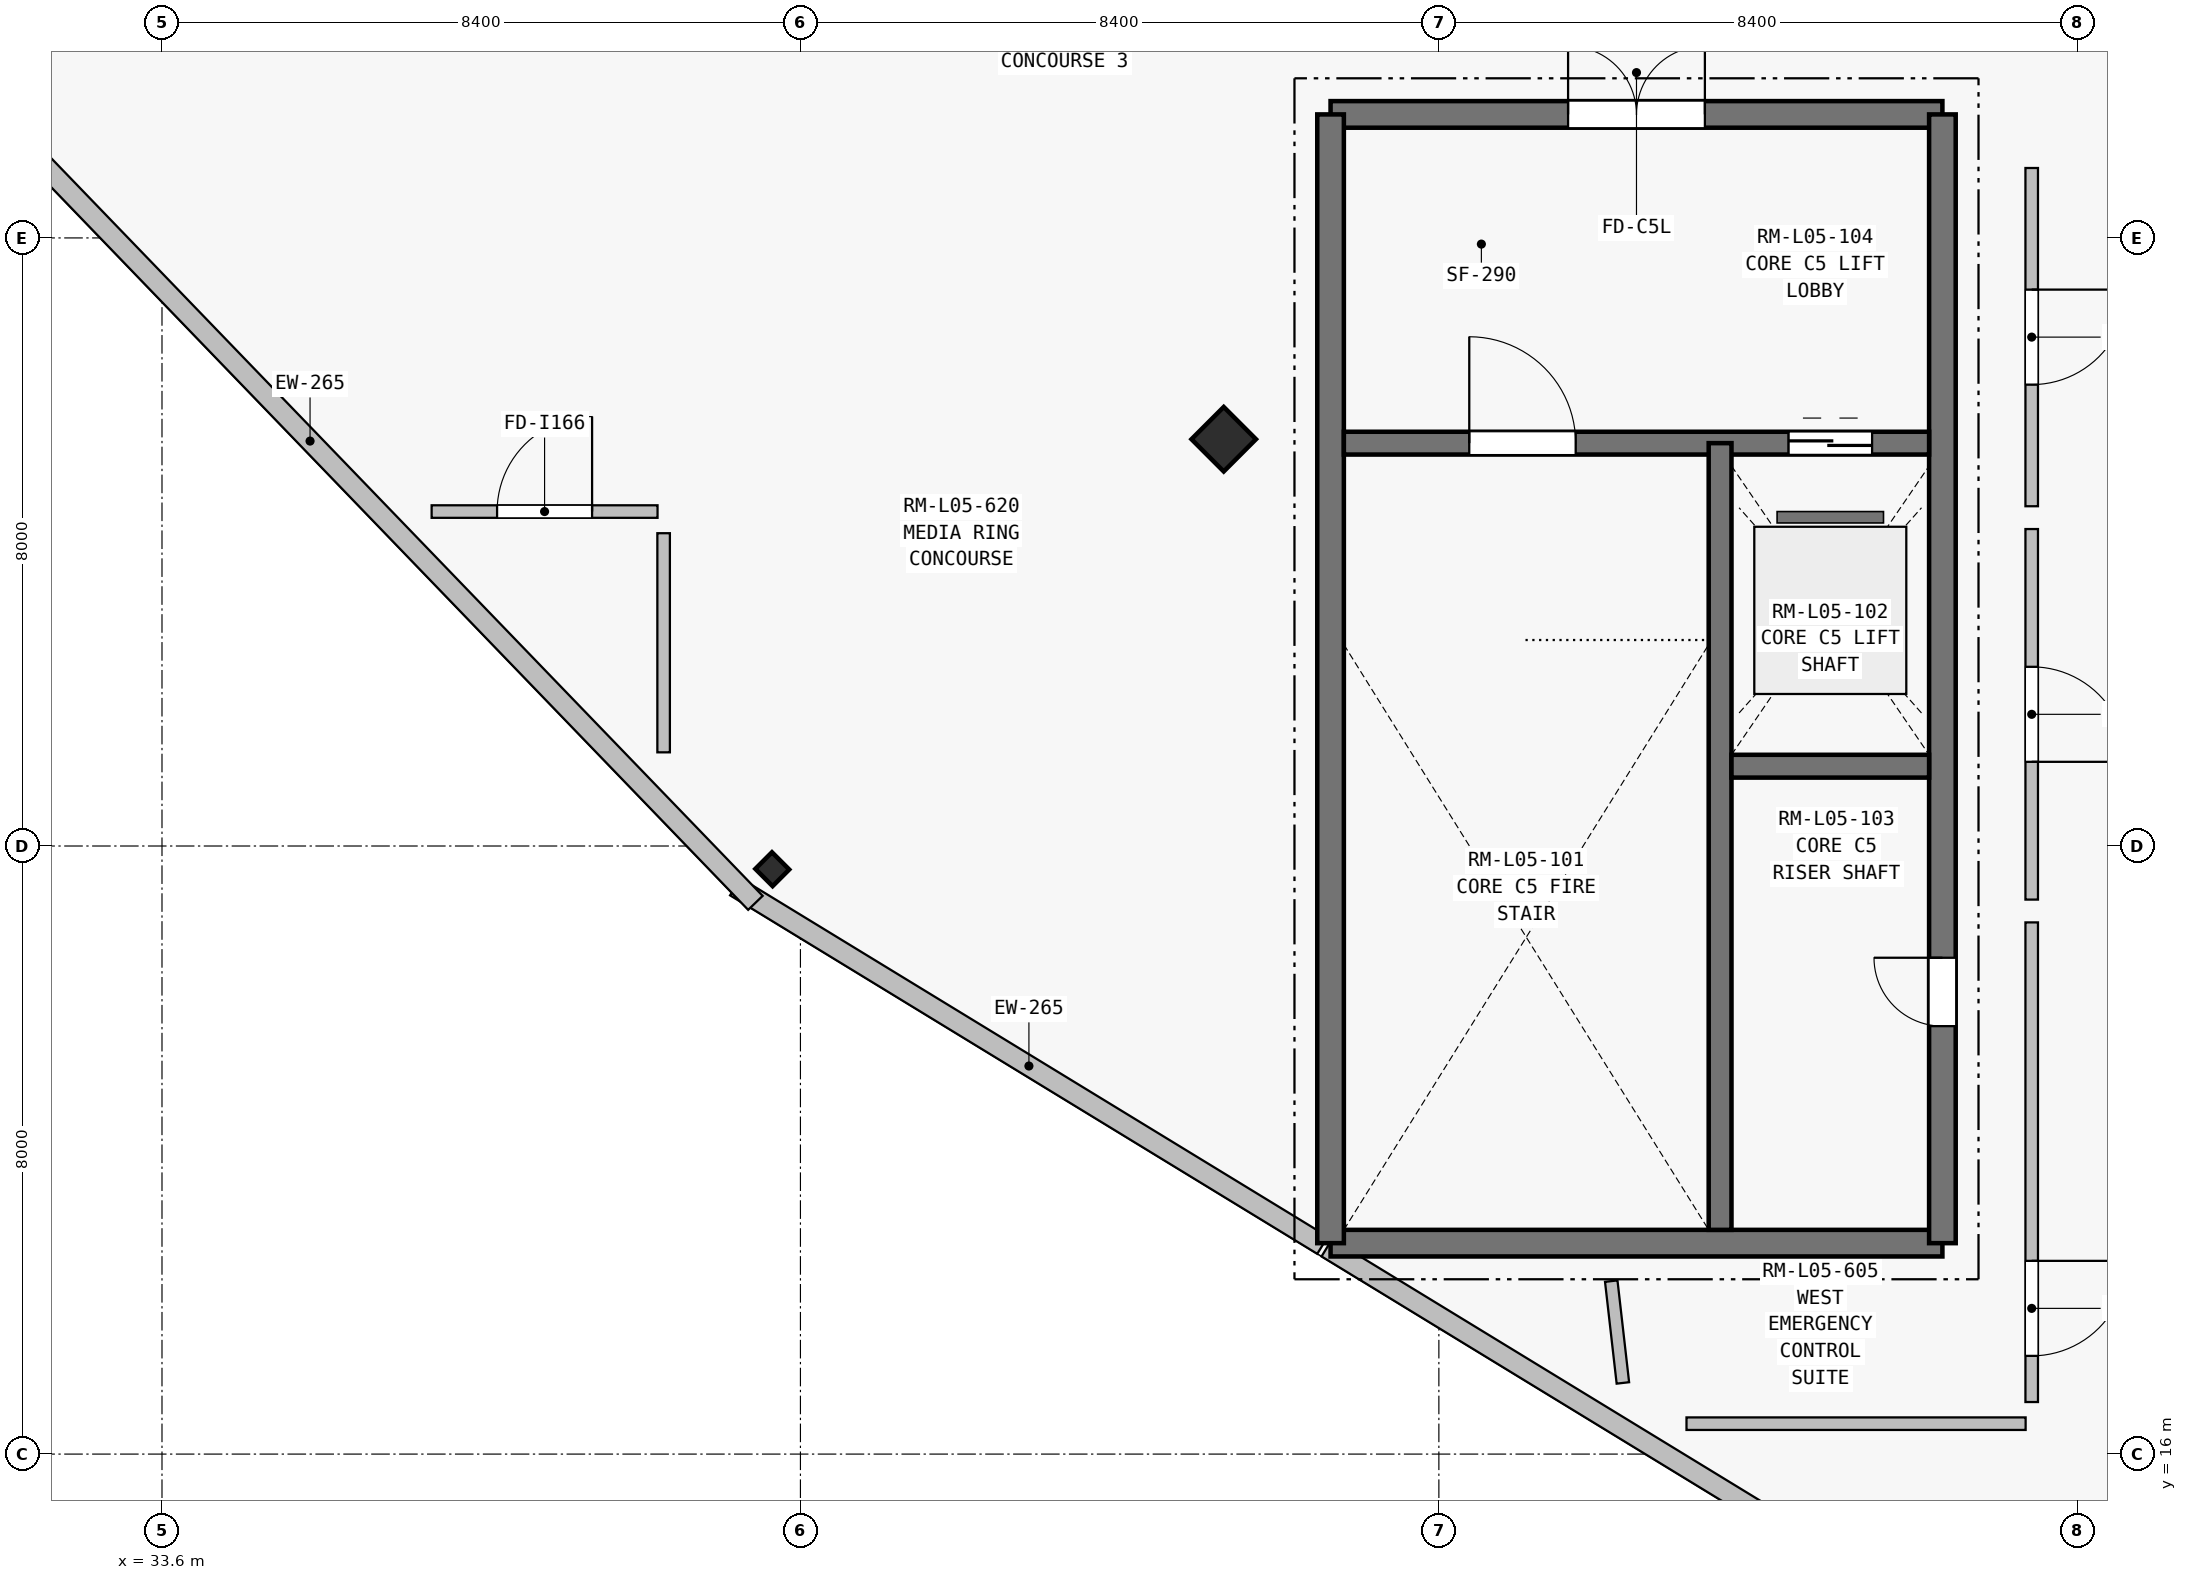
"""IFC4 building model, lengths in metres.
Left out: names, types, materials, properties, quantities, classifications, styles, units other than length and angle.
Written with IfcOpenShell. Run it as: python <this file> out.ifc"""

import sys

from ifc_helpers import new_model, si_unit, direction, frame, frame_2d, origin, origin_2d, place, context, subcontext, project, spatial, rectangle, i_section, extrude, element, fill, save


model = new_model("IFC4")
c1 = context("Model", 3, precision=1e-05, world=origin(), true_north=direction((0.0, 1.0)))
c2 = subcontext(c1, "Body", "Model", "MODEL_VIEW")
j1 = project(units=[si_unit("LENGTHUNIT", "METRE"), si_unit("PLANEANGLEUNIT", "RADIAN")], contexts=[c1])
p1 = place(None, origin())
s1 = spatial("IfcSite", under=j1, at=p1, CompositionType="ELEMENT")
p2 = place(p1, origin())
s2 = spatial("IfcBuilding", under=s1, at=p2, CompositionType="ELEMENT")
p3 = place(p2, frame((0.0, 0.0, 23.4)))
s3 = spatial("IfcBuildingStorey", under=s2, at=p3, CompositionType="ELEMENT", Elevation=23.4)
p4 = place(p3, frame((47.569, 29.352, 0.0), z_axis=(0.0, 0.0, 1.0), x_axis=(-0.707106781187, -0.707106781187, 0.0)))
e1 = element("IfcColumn", 1, at=p4, inside=s3, PredefinedType="COLUMN", context=c2, shape_type="SweptSolid", body=[
    extrude(rectangle(XDim=0.6, YDim=0.6, at=origin_2d()), origin(), (0.0, 0.0, 1.0), 3.15),
])
p5 = place(p3, frame((41.63, 23.695, 0.0), z_axis=(0.0, 0.0, 1.0), x_axis=(-0.707106781187, -0.707106781187, 0.0)))
e2 = element("IfcColumn", 2, at=p5, inside=s3, PredefinedType="COLUMN", context=c2, shape_type="SweptSolid", body=[
    extrude(i_section(OverallWidth=0.309, OverallDepth=0.321, WebThickness=0.014, FlangeThickness=0.022, at=origin_2d()), origin(), (0.0, 0.0, 1.0), 3.32),
])
p6 = place(p3, frame((56.4, 14.15, 0.0), z_axis=(0.0, 0.0, 1.0), x_axis=(-0.853522240257, 0.521056412864, 0.0)))
e3 = element("IfcWall", 3, at=p6, inside=s3, PredefinedType="SOLIDWALL", context=c2, shape_type="SweptSolid", body=[
    extrude(rectangle(XDim=8.758, YDim=0.265, at=frame_2d((4.379, 0.0))), origin(), (0.0, 0.0, 1.0), 3.18),
])
p7 = place(p3, frame((48.869, 18.748, 0.0), z_axis=(0.0, 0.0, 1.0), x_axis=(-0.853521769318, 0.52105718429, 0.0)))
e4 = element("IfcWall", 4, at=p7, inside=s3, PredefinedType="SOLIDWALL", context=c2, shape_type="SweptSolid", body=[
    extrude(rectangle(XDim=9.052, YDim=0.265, at=frame_2d((4.526, 0.0))), origin(), (0.0, 0.0, 1.0), 3.18),
])
p8 = place(p3, frame((41.408, 23.252, 0.0), z_axis=(0.0, 0.0, 1.0), x_axis=(-0.694213985366, 0.719768672924, 0.0)))
e5 = element("IfcWall", 5, at=p8, inside=s3, PredefinedType="SOLIDWALL", context=c2, shape_type="SweptSolid", body=[
    extrude(rectangle(XDim=16.881, YDim=0.265, at=frame_2d((8.441, 0.0))), origin(), (0.0, 0.0, 1.0), 3.18),
])
p9 = place(p3, frame((48.975, 18.775, 0.0), z_axis=(0.0, 0.0, 1.0), x_axis=(1.0, 0.0, 0.0)))
e6 = element("IfcWall", 6, at=p9, inside=s3, PredefinedType="SHEAR", context=c2, shape_type="SweptSolid", body=[
    extrude(rectangle(XDim=8.05, YDim=0.35, at=frame_2d((4.025, 0.0))), origin(), (0.0, 0.0, 1.0), 3.08),
])
p10 = place(p3, frame((48.975, 33.625, 0.0), z_axis=(0.0, 0.0, 1.0), x_axis=(1.0, 0.0, 0.0)))
e7 = element("IfcWall", 7, at=p10, inside=s3, PredefinedType="SHEAR", context=c2, shape_type="SweptSolid", body=[
    extrude(rectangle(XDim=8.05, YDim=0.35, at=frame_2d((4.025, 0.0))), origin(), (0.0, 0.0, 1.0), 3.08),
])
p11 = place(p10, frame((3.125, 0.0, 0.0)))
e8 = element("IfcOpeningElement", 8, at=p11, cuts=e7, PredefinedType="OPENING", context=c2, shape_type="SweptSolid", body=[
    extrude(rectangle(XDim=1.8, YDim=2.25, at=frame_2d((0.9, 1.125))), frame((0.0, 0.185, 0.0), z_axis=(0.0, -1.0, 0.0), x_axis=(1.0, 0.0, 0.0)), (0.0, 0.0, 1.0), 0.37),
])
p12 = place(p3, frame((48.975, 18.775, 0.0), z_axis=(0.0, 0.0, 1.0), x_axis=(0.0, 1.0, 0.0)))
e9 = element("IfcWall", 9, at=p12, inside=s3, PredefinedType="SHEAR", context=c2, shape_type="SweptSolid", body=[
    extrude(rectangle(XDim=14.85, YDim=0.35, at=frame_2d((7.425, 0.0))), origin(), (0.0, 0.0, 1.0), 3.08),
])
p13 = place(p3, frame((57.025, 18.775, 0.0), z_axis=(0.0, 0.0, 1.0), x_axis=(0.0, 1.0, 0.0)))
e10 = element("IfcWall", 10, at=p13, inside=s3, PredefinedType="SHEAR", context=c2, shape_type="SweptSolid", body=[
    extrude(rectangle(XDim=14.85, YDim=0.35, at=frame_2d((7.425, 0.0))), origin(), (0.0, 0.0, 1.0), 3.08),
])
p14 = place(p13, frame((2.855, 0.0, 0.0)))
e11 = element("IfcOpeningElement", 11, at=p14, cuts=e10, PredefinedType="OPENING", context=c2, shape_type="SweptSolid", body=[
    extrude(rectangle(XDim=0.9, YDim=2.1, at=frame_2d((0.45, 1.05))), frame((0.0, 0.185, 0.0), z_axis=(0.0, -1.0, 0.0), x_axis=(1.0, 0.0, 0.0)), (0.0, 0.0, 1.0), 0.37),
])
p15 = place(p3, frame((49.15, 29.3, 0.0), z_axis=(0.0, 0.0, 1.0), x_axis=(1.0, 0.0, 0.0)))
e12 = element("IfcWall", 12, at=p15, inside=s3, PredefinedType="SHEAR", context=c2, shape_type="SweptSolid", body=[
    extrude(rectangle(XDim=7.7, YDim=0.3, at=frame_2d((3.85, 0.0))), origin(), (0.0, 0.0, 1.0), 3.08),
])
p16 = place(p15, frame((1.65, 0.0, 0.0)))
e13 = element("IfcOpeningElement", 13, at=p16, cuts=e12, PredefinedType="OPENING", context=c2, shape_type="SweptSolid", body=[
    extrude(rectangle(XDim=1.4, YDim=2.2, at=frame_2d((0.7, 1.1))), frame((0.0, 0.16, 0.0), z_axis=(0.0, -1.0, 0.0), x_axis=(1.0, 0.0, 0.0)), (0.0, 0.0, 1.0), 0.32),
])
p17 = place(p15, frame((5.85, 0.0, 0.0)))
e14 = element("IfcOpeningElement", 14, at=p17, cuts=e12, PredefinedType="OPENING", context=c2, shape_type="SweptSolid", body=[
    extrude(rectangle(XDim=1.1, YDim=2.2, at=frame_2d((0.55, 1.1))), frame((0.0, 0.16, 0.0), z_axis=(0.0, -1.0, 0.0), x_axis=(1.0, 0.0, 0.0)), (0.0, 0.0, 1.0), 0.32),
])
p18 = place(p3, frame((54.1, 18.95, 0.0), z_axis=(0.0, 0.0, 1.0), x_axis=(0.0, 1.0, 0.0)))
e15 = element("IfcWall", 15, at=p18, inside=s3, PredefinedType="SHEAR", context=c2, shape_type="SweptSolid", body=[
    extrude(rectangle(XDim=10.35, YDim=0.3, at=frame_2d((5.175, 0.0))), origin(), (0.0, 0.0, 1.0), 3.08),
])
p19 = place(p3, frame((54.25, 25.05, 0.0), z_axis=(0.0, 0.0, 1.0), x_axis=(1.0, 0.0, 0.0)))
e16 = element("IfcWall", 16, at=p19, inside=s3, PredefinedType="SHEAR", context=c2, shape_type="SweptSolid", body=[
    extrude(rectangle(XDim=2.6, YDim=0.3, at=frame_2d((1.3, 0.0))), origin(), (0.0, 0.0, 1.0), 3.08),
])
p20 = place(p3, frame((58.12, 16.4, 0.0), z_axis=(0.0, 0.0, 1.0), x_axis=(-1.0, 0.0, 0.0)))
e17 = element("IfcWall", 17, at=p20, inside=s3, PredefinedType="PARTITIONING", context=c2, shape_type="SweptSolid", body=[
    extrude(rectangle(XDim=4.462, YDim=0.165, at=frame_2d((2.231, 0.0))), origin(), (0.0, 0.0, 1.0), 2.5),
])
p21 = place(p3, frame((52.821, 16.936, 0.0), z_axis=(0.0, 0.0, 1.0), x_axis=(-0.113551698824, 0.99353208891, 0.0)))
e18 = element("IfcWall", 18, at=p21, inside=s3, PredefinedType="PARTITIONING", context=c2, shape_type="SweptSolid", body=[
    extrude(rectangle(XDim=1.348, YDim=0.165, at=frame_2d((0.674, 0.0))), origin(), (0.0, 0.0, 1.0), 2.5),
])
p22 = place(p3, frame((58.2, 22.995, 0.0), z_axis=(0.0, 0.0, 1.0), x_axis=(0.0, -1.0, 0.0)))
e19 = element("IfcWall", 19, at=p22, inside=s3, PredefinedType="PARTITIONING", context=c2, shape_type="SweptSolid", body=[
    extrude(rectangle(XDim=6.31, YDim=0.165, at=frame_2d((3.155, 0.0))), origin(), (0.0, 0.0, 1.0), 3.18),
])
p23 = place(p22, frame((4.453, 0.0, 0.0)))
e20 = element("IfcOpeningElement", 20, at=p23, cuts=e19, PredefinedType="OPENING", context=c2, shape_type="SweptSolid", body=[
    extrude(rectangle(XDim=1.25, YDim=2.25, at=frame_2d((0.625, 1.125))), frame((0.0, 0.093, 0.0), z_axis=(0.0, -1.0, 0.0), x_axis=(1.0, 0.0, 0.0)), (0.0, 0.0, 1.0), 0.185),
])
p24 = place(p3, frame((58.2, 28.17, 0.0), z_axis=(0.0, 0.0, 1.0), x_axis=(0.0, -1.0, 0.0)))
e21 = element("IfcWall", 21, at=p24, inside=s3, PredefinedType="PARTITIONING", context=c2, shape_type="SweptSolid", body=[
    extrude(rectangle(XDim=4.875, YDim=0.165, at=frame_2d((2.438, 0.0))), origin(), (0.0, 0.0, 1.0), 3.18),
])
p25 = place(p24, frame((1.812, 0.0, 0.0)))
e22 = element("IfcOpeningElement", 22, at=p25, cuts=e21, PredefinedType="OPENING", context=c2, shape_type="SweptSolid", body=[
    extrude(rectangle(XDim=1.25, YDim=2.25, at=frame_2d((0.625, 1.125))), frame((0.0, 0.093, 0.0), z_axis=(0.0, -1.0, 0.0), x_axis=(1.0, 0.0, 0.0)), (0.0, 0.0, 1.0), 0.185),
])
p26 = place(p3, frame((58.2, 32.92, 0.0), z_axis=(0.0, 0.0, 1.0), x_axis=(0.0, -1.0, 0.0)))
e23 = element("IfcWall", 23, at=p26, inside=s3, PredefinedType="PARTITIONING", context=c2, shape_type="SweptSolid", body=[
    extrude(rectangle(XDim=4.45, YDim=0.165, at=frame_2d((2.225, 0.0))), origin(), (0.0, 0.0, 1.0), 2.445),
])
p27 = place(p26, frame((1.6, 0.0, 0.0)))
e24 = element("IfcOpeningElement", 24, at=p27, cuts=e23, PredefinedType="OPENING", context=c2, shape_type="SweptSolid", body=[
    extrude(rectangle(XDim=1.25, YDim=2.25, at=frame_2d((0.625, 1.125))), frame((0.0, 0.093, 0.0), z_axis=(0.0, -1.0, 0.0), x_axis=(1.0, 0.0, 0.0)), (0.0, 0.0, 1.0), 0.185),
])
p28 = place(p3, frame((37.148, 28.4, 0.0), z_axis=(0.0, 0.0, 1.0), x_axis=(1.0, 0.0, 0.0)))
e25 = element("IfcWall", 25, at=p28, inside=s3, PredefinedType="PARTITIONING", context=c2, shape_type="SweptSolid", body=[
    extrude(rectangle(XDim=2.972, YDim=0.165, at=frame_2d((1.486, 0.0))), origin(), (0.0, 0.0, 1.0), 2.5),
])
p29 = place(p28, frame((0.861, 0.0, 0.0)))
e26 = element("IfcOpeningElement", 26, at=p29, cuts=e25, PredefinedType="OPENING", context=c2, shape_type="SweptSolid", body=[
    extrude(rectangle(XDim=1.25, YDim=2.25, at=frame_2d((0.625, 1.125))), frame((0.0, 0.093, 0.0), z_axis=(0.0, -1.0, 0.0), x_axis=(1.0, 0.0, 0.0)), (0.0, 0.0, 1.0), 0.185),
])
p30 = place(p3, frame((40.2, 28.115, 0.0), z_axis=(0.0, 0.0, 1.0), x_axis=(0.0, -1.0, 0.0)))
e27 = element("IfcWall", 27, at=p30, inside=s3, PredefinedType="PARTITIONING", context=c2, shape_type="SweptSolid", body=[
    extrude(rectangle(XDim=2.883, YDim=0.165, at=frame_2d((1.441, 0.0))), origin(), (0.0, 0.0, 1.0), 2.5),
])
p31 = place(p11, origin())
e28 = element("IfcDoor", 28, at=p31, inside=s3, OperationType="DOUBLE_DOOR_SINGLE_SWING", PredefinedType="DOOR", context=c2, shape_type="SweptSolid", body=[
    extrude(rectangle(XDim=1.8, YDim=2.25, at=frame_2d((0.9, 1.125))), frame((0.0, 0.025, 0.0), z_axis=(0.0, -1.0, 0.0), x_axis=(1.0, 0.0, 0.0)), (0.0, 0.0, 1.0), 0.05),
])
fill(e8, e28)
p32 = place(p16, origin())
e29 = element("IfcDoor", 29, at=p32, inside=s3, OperationType="SINGLE_SWING_LEFT", PredefinedType="DOOR", context=c2, shape_type="SweptSolid", body=[
    extrude(rectangle(XDim=1.4, YDim=2.2, at=frame_2d((0.7, 1.1))), frame((0.0, 0.025, 0.0), z_axis=(0.0, -1.0, 0.0), x_axis=(1.0, 0.0, 0.0)), (0.0, 0.0, 1.0), 0.05),
])
fill(e13, e29)
p33 = place(p14, origin())
e30 = element("IfcDoor", 30, at=p33, inside=s3, OperationType="SINGLE_SWING_RIGHT", PredefinedType="DOOR", context=c2, shape_type="SweptSolid", body=[
    extrude(rectangle(XDim=0.9, YDim=2.1, at=frame_2d((0.45, 1.05))), frame((0.0, 0.025, 0.0), z_axis=(0.0, -1.0, 0.0), x_axis=(1.0, 0.0, 0.0)), (0.0, 0.0, 1.0), 0.05),
])
fill(e11, e30)
p34 = place(p17, origin())
e31 = element("IfcDoor", 31, at=p34, inside=s3, OperationType="SLIDING_TO_LEFT", PredefinedType="DOOR", context=c2, shape_type="SweptSolid", body=[
    extrude(rectangle(XDim=1.1, YDim=2.2, at=frame_2d((0.55, 1.1))), frame((0.0, 0.025, 0.0), z_axis=(0.0, -1.0, 0.0), x_axis=(1.0, 0.0, 0.0)), (0.0, 0.0, 1.0), 0.05),
])
fill(e14, e31)
p35 = place(p23, origin())
e32 = element("IfcDoor", 32, at=p35, inside=s3, OperationType="SINGLE_SWING_LEFT", PredefinedType="DOOR", context=c2, shape_type="SweptSolid", body=[
    extrude(rectangle(XDim=1.25, YDim=2.25, at=frame_2d((0.625, 1.125))), frame((0.0, 0.025, 0.0), z_axis=(0.0, -1.0, 0.0), x_axis=(1.0, 0.0, 0.0)), (0.0, 0.0, 1.0), 0.05),
])
fill(e20, e32)
p36 = place(p25, origin())
e33 = element("IfcDoor", 33, at=p36, inside=s3, OperationType="SINGLE_SWING_RIGHT", PredefinedType="DOOR", context=c2, shape_type="SweptSolid", body=[
    extrude(rectangle(XDim=1.25, YDim=2.25, at=frame_2d((0.625, 1.125))), frame((0.0, 0.025, 0.0), z_axis=(0.0, -1.0, 0.0), x_axis=(1.0, 0.0, 0.0)), (0.0, 0.0, 1.0), 0.05),
])
fill(e22, e33)
p37 = place(p27, origin())
e34 = element("IfcDoor", 34, at=p37, inside=s3, OperationType="SINGLE_SWING_LEFT", PredefinedType="DOOR", context=c2, shape_type="SweptSolid", body=[
    extrude(rectangle(XDim=1.25, YDim=2.25, at=frame_2d((0.625, 1.125))), frame((0.0, 0.025, 0.0), z_axis=(0.0, -1.0, 0.0), x_axis=(1.0, 0.0, 0.0)), (0.0, 0.0, 1.0), 0.05),
])
fill(e24, e34)
p38 = place(p29, origin())
e35 = element("IfcDoor", 35, at=p38, inside=s3, OperationType="SINGLE_SWING_RIGHT", PredefinedType="DOOR", context=c2, shape_type="SweptSolid", body=[
    extrude(rectangle(XDim=1.25, YDim=2.25, at=frame_2d((0.625, 1.125))), frame((0.0, 0.025, 0.0), z_axis=(0.0, -1.0, 0.0), x_axis=(1.0, 0.0, 0.0)), (0.0, 0.0, 1.0), 0.05),
])
fill(e26, e35)
save(model, sys.argv[1])
